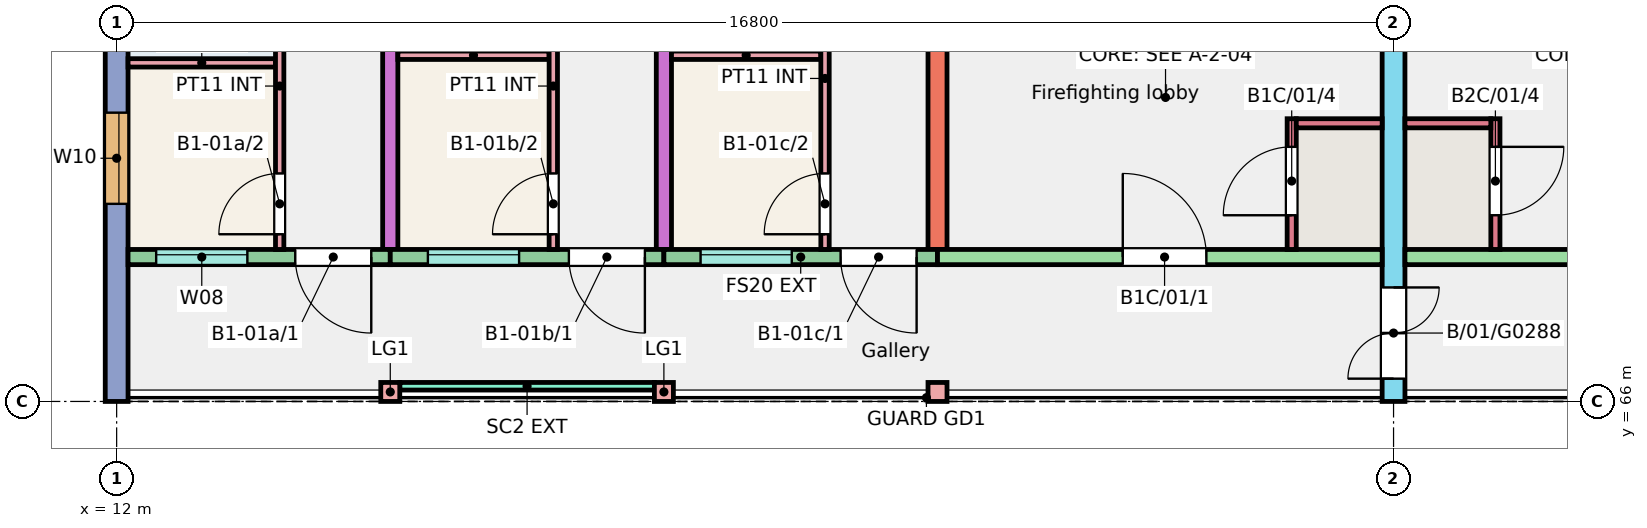
"""IFC4 building model, lengths in metres.
Left out: names, types, materials, properties, quantities, classifications, styles, units other than length and angle.
Written with IfcOpenShell. Run it as: python <this file> out.ifc"""

import sys

from ifc_helpers import new_model, si_unit, direction, frame, frame_2d, origin, origin_2d, place, context, subcontext, project, spatial, rectangle, extrude, element, fill, save


model = new_model("IFC4")
c1 = context("Model", 3, precision=1e-05, world=origin(), true_north=direction((0.0, 1.0)))
c2 = subcontext(c1, "Body", "Model", "MODEL_VIEW")
j1 = project(units=[si_unit("LENGTHUNIT", "METRE"), si_unit("PLANEANGLEUNIT", "RADIAN")], contexts=[c1])
p1 = place(None, origin())
s1 = spatial("IfcSite", under=j1, at=p1, CompositionType="ELEMENT")
p2 = place(p1, origin())
s2 = spatial("IfcBuilding", under=s1, at=p2, CompositionType="ELEMENT")
p3 = place(p2, frame((0.0, 0.0, 3.0)))
s3 = spatial("IfcBuildingStorey", under=s2, at=p3, CompositionType="ELEMENT", Elevation=3.0)
p4 = place(p3, frame((12.0, 66.0, 0.0), z_axis=(0.0, 0.0, 1.0), x_axis=(0.0, 1.0, 0.0)))
e1 = element("IfcWall", 1, at=p4, inside=s3, PredefinedType="SHEAR", context=c2, shape_type="SweptSolid", body=[
    extrude(rectangle(XDim=11.0, YDim=0.3, at=frame_2d((5.5, 0.0))), origin(), (0.0, 0.0, 1.0), 3.0),
])
p5 = place(p4, frame((2.6, 0.0, 0.9)))
e2 = element("IfcOpeningElement", 2, at=p5, cuts=e1, PredefinedType="OPENING", context=c2, shape_type="SweptSolid", body=[
    extrude(rectangle(XDim=1.2, YDim=1.5, at=frame_2d((0.6, 0.75))), frame((0.0, 0.16, 0.0), z_axis=(0.0, -1.0, 0.0), x_axis=(1.0, 0.0, 0.0)), (0.0, 0.0, 1.0), 0.32),
])
p6 = place(p4, frame((7.805, 0.0, 0.9)))
e3 = element("IfcOpeningElement", 3, at=p6, cuts=e1, PredefinedType="OPENING", context=c2, shape_type="SweptSolid", body=[
    extrude(rectangle(XDim=1.8, YDim=1.5, at=frame_2d((0.9, 0.75))), frame((0.0, 0.16, 0.0), z_axis=(0.0, -1.0, 0.0), x_axis=(1.0, 0.0, 0.0)), (0.0, 0.0, 1.0), 0.32),
])
for number, where, z_axis, x_axis in (
    (4, (15.6, 68.0, 0.0), (0.0, 0.0, 1.0), (0.0, 1.0, 0.0)),
    (5, (19.2, 68.0, 0.0), (0.0, 0.0, 1.0), (0.0, 1.0, 0.0)),
):
    element("IfcWall", number, at=place(p3, frame(where, z_axis=z_axis, x_axis=x_axis)), inside=s3, PredefinedType="SHEAR", context=c2, shape_type="SweptSolid", body=[
        extrude(rectangle(XDim=9.0, YDim=0.2, at=frame_2d((4.5, 0.0))), origin(), (0.0, 0.0, 1.0), 3.0),
    ])
p7 = place(p3, frame((22.8, 68.0, 0.0), z_axis=(0.0, 0.0, 1.0), x_axis=(0.0, 1.0, 0.0)))
e6 = element("IfcWall", 6, at=p7, inside=s3, PredefinedType="SHEAR", context=c2, shape_type="SweptSolid", body=[
    extrude(rectangle(XDim=9.0, YDim=0.25, at=frame_2d((4.5, 0.0))), origin(), (0.0, 0.0, 1.0), 3.0),
])
p8 = place(p3, frame((28.8, 66.0, 0.0), z_axis=(0.0, 0.0, 1.0), x_axis=(0.0, 1.0, 0.0)))
e7 = element("IfcWall", 7, at=p8, inside=s3, PredefinedType="SHEAR", context=c2, shape_type="SweptSolid", body=[
    extrude(rectangle(XDim=11.0, YDim=0.3, at=frame_2d((5.5, 0.0))), origin(), (0.0, 0.0, 1.0), 3.0),
])
p9 = place(p8, frame((0.3, 0.0, 0.0)))
e8 = element("IfcOpeningElement", 8, at=p9, cuts=e7, PredefinedType="OPENING", context=c2, shape_type="SweptSolid", body=[
    extrude(rectangle(XDim=1.2, YDim=2.1, at=frame_2d((0.6, 1.05))), frame((0.0, 0.16, 0.0), z_axis=(0.0, -1.0, 0.0), x_axis=(1.0, 0.0, 0.0)), (0.0, 0.0, 1.0), 0.32),
])
p10 = place(p3, frame((12.15, 67.9, 0.0), z_axis=(0.0, 0.0, 1.0), x_axis=(1.0, 0.0, 0.0)))
e9 = element("IfcWall", 9, at=p10, inside=s3, PredefinedType="SOLIDWALL", context=c2, shape_type="SweptSolid", body=[
    extrude(rectangle(XDim=3.45, YDim=0.2, at=frame_2d((1.725, 0.0))), origin(), (0.0, 0.0, 1.0), 3.0),
])
p11 = place(p10, frame((0.37, 0.0, 1.1)))
e10 = element("IfcOpeningElement", 10, at=p11, cuts=e9, PredefinedType="OPENING", context=c2, shape_type="SweptSolid", body=[
    extrude(rectangle(XDim=1.2, YDim=1.3, at=frame_2d((0.6, 0.65))), frame((0.0, 0.11, 0.0), z_axis=(0.0, -1.0, 0.0), x_axis=(1.0, 0.0, 0.0)), (0.0, 0.0, 1.0), 0.22),
])
p12 = place(p10, frame((2.2, 0.0, 0.0)))
e11 = element("IfcOpeningElement", 11, at=p12, cuts=e9, PredefinedType="OPENING", context=c2, shape_type="SweptSolid", body=[
    extrude(rectangle(XDim=1.0, YDim=2.1, at=frame_2d((0.5, 1.05))), frame((0.0, 0.11, 0.0), z_axis=(0.0, -1.0, 0.0), x_axis=(1.0, 0.0, 0.0)), (0.0, 0.0, 1.0), 0.22),
])
p13 = place(p3, frame((15.6, 67.9, 0.0), z_axis=(0.0, 0.0, 1.0), x_axis=(1.0, 0.0, 0.0)))
e12 = element("IfcWall", 12, at=p13, inside=s3, PredefinedType="SOLIDWALL", context=c2, shape_type="SweptSolid", body=[
    extrude(rectangle(XDim=3.6, YDim=0.2, at=frame_2d((1.8, 0.0))), origin(), (0.0, 0.0, 1.0), 3.0),
])
p14 = place(p13, frame((0.495, 0.0, 1.1)))
e13 = element("IfcOpeningElement", 13, at=p14, cuts=e12, PredefinedType="OPENING", context=c2, shape_type="SweptSolid", body=[
    extrude(rectangle(XDim=1.2, YDim=1.3, at=frame_2d((0.6, 0.65))), frame((0.0, 0.11, 0.0), z_axis=(0.0, -1.0, 0.0), x_axis=(1.0, 0.0, 0.0)), (0.0, 0.0, 1.0), 0.22),
])
p15 = place(p13, frame((2.35, 0.0, 0.0)))
e14 = element("IfcOpeningElement", 14, at=p15, cuts=e12, PredefinedType="OPENING", context=c2, shape_type="SweptSolid", body=[
    extrude(rectangle(XDim=1.0, YDim=2.1, at=frame_2d((0.5, 1.05))), frame((0.0, 0.11, 0.0), z_axis=(0.0, -1.0, 0.0), x_axis=(1.0, 0.0, 0.0)), (0.0, 0.0, 1.0), 0.22),
])
p16 = place(p3, frame((19.2, 67.9, 0.0), z_axis=(0.0, 0.0, 1.0), x_axis=(1.0, 0.0, 0.0)))
e15 = element("IfcWall", 15, at=p16, inside=s3, PredefinedType="SOLIDWALL", context=c2, shape_type="SweptSolid", body=[
    extrude(rectangle(XDim=3.6, YDim=0.2, at=frame_2d((1.8, 0.0))), origin(), (0.0, 0.0, 1.0), 3.0),
])
p17 = place(p16, frame((0.482, 0.0, 1.1)))
e16 = element("IfcOpeningElement", 16, at=p17, cuts=e15, PredefinedType="OPENING", context=c2, shape_type="SweptSolid", body=[
    extrude(rectangle(XDim=1.2, YDim=1.3, at=frame_2d((0.6, 0.65))), frame((0.0, 0.11, 0.0), z_axis=(0.0, -1.0, 0.0), x_axis=(1.0, 0.0, 0.0)), (0.0, 0.0, 1.0), 0.22),
])
p18 = place(p16, frame((2.325, 0.0, 0.0)))
e17 = element("IfcOpeningElement", 17, at=p18, cuts=e15, PredefinedType="OPENING", context=c2, shape_type="SweptSolid", body=[
    extrude(rectangle(XDim=1.0, YDim=2.1, at=frame_2d((0.5, 1.05))), frame((0.0, 0.11, 0.0), z_axis=(0.0, -1.0, 0.0), x_axis=(1.0, 0.0, 0.0)), (0.0, 0.0, 1.0), 0.22),
])
p19 = place(p3, frame((22.8, 67.9, 0.0), z_axis=(0.0, 0.0, 1.0), x_axis=(1.0, 0.0, 0.0)))
e18 = element("IfcWall", 18, at=p19, inside=s3, PredefinedType="SHEAR", context=c2, shape_type="SweptSolid", body=[
    extrude(rectangle(XDim=5.85, YDim=0.2, at=frame_2d((2.925, 0.0))), origin(), (0.0, 0.0, 1.0), 3.0),
])
p20 = place(p19, frame((2.438, 0.0, 0.0)))
e19 = element("IfcOpeningElement", 19, at=p20, cuts=e18, PredefinedType="OPENING", context=c2, shape_type="SweptSolid", body=[
    extrude(rectangle(XDim=1.1, YDim=2.1, at=frame_2d((0.55, 1.05))), frame((0.0, 0.11, 0.0), z_axis=(0.0, -1.0, 0.0), x_axis=(1.0, 0.0, 0.0)), (0.0, 0.0, 1.0), 0.22),
])
p21 = place(p3, frame((27.46, 68.0, 0.0), z_axis=(0.0, 0.0, 1.0), x_axis=(0.0, 1.0, 0.0)))
e20 = element("IfcWall", 20, at=p21, inside=s3, PredefinedType="SHEAR", context=c2, shape_type="SweptSolid", body=[
    extrude(rectangle(XDim=1.72, YDim=0.12, at=frame_2d((0.86, 0.0))), origin(), (0.0, 0.0, 1.0), 3.0),
])
p22 = place(p21, frame((0.45, 0.0, 0.0)))
e21 = element("IfcOpeningElement", 21, at=p22, cuts=e20, PredefinedType="OPENING", context=c2, shape_type="SweptSolid", body=[
    extrude(rectangle(XDim=0.9, YDim=2.1, at=frame_2d((0.45, 1.05))), frame((0.0, 0.07, 0.0), z_axis=(0.0, -1.0, 0.0), x_axis=(1.0, 0.0, 0.0)), (0.0, 0.0, 1.0), 0.14),
])
p23 = place(p3, frame((27.52, 69.66, 0.0), z_axis=(0.0, 0.0, 1.0), x_axis=(1.0, 0.0, 0.0)))
e22 = element("IfcWall", 22, at=p23, inside=s3, PredefinedType="SHEAR", context=c2, shape_type="SweptSolid", body=[
    extrude(rectangle(XDim=1.13, YDim=0.12, at=frame_2d((0.565, 0.0))), origin(), (0.0, 0.0, 1.0), 3.0),
])
p24 = place(p3, frame((28.95, 67.9, 0.0), z_axis=(0.0, 0.0, 1.0), x_axis=(1.0, 0.0, 0.0)))
e23 = element("IfcWall", 23, at=p24, inside=s3, PredefinedType="SHEAR", context=c2, shape_type="SweptSolid", body=[
    extrude(rectangle(XDim=5.85, YDim=0.2, at=frame_2d((2.925, 0.0))), origin(), (0.0, 0.0, 1.0), 3.0),
])
p25 = place(p24, frame((2.312, 0.0, 0.0)))
e24 = element("IfcOpeningElement", 24, at=p25, cuts=e23, PredefinedType="OPENING", context=c2, shape_type="SweptSolid", body=[
    extrude(rectangle(XDim=1.1, YDim=2.1, at=frame_2d((0.55, 1.05))), frame((0.0, 0.11, 0.0), z_axis=(0.0, -1.0, 0.0), x_axis=(1.0, 0.0, 0.0)), (0.0, 0.0, 1.0), 0.22),
])
p26 = place(p3, frame((30.14, 68.0, 0.0), z_axis=(0.0, 0.0, 1.0), x_axis=(0.0, 1.0, 0.0)))
e25 = element("IfcWall", 25, at=p26, inside=s3, PredefinedType="SHEAR", context=c2, shape_type="SweptSolid", body=[
    extrude(rectangle(XDim=1.72, YDim=0.12, at=frame_2d((0.86, 0.0))), origin(), (0.0, 0.0, 1.0), 3.0),
])
p27 = place(p26, frame((0.45, 0.0, 0.0)))
e26 = element("IfcOpeningElement", 26, at=p27, cuts=e25, PredefinedType="OPENING", context=c2, shape_type="SweptSolid", body=[
    extrude(rectangle(XDim=0.9, YDim=2.1, at=frame_2d((0.45, 1.05))), frame((0.0, 0.07, 0.0), z_axis=(0.0, -1.0, 0.0), x_axis=(1.0, 0.0, 0.0)), (0.0, 0.0, 1.0), 0.14),
])
p28 = place(p3, frame((28.95, 69.66, 0.0), z_axis=(0.0, 0.0, 1.0), x_axis=(1.0, 0.0, 0.0)))
e27 = element("IfcWall", 27, at=p28, inside=s3, PredefinedType="SHEAR", context=c2, shape_type="SweptSolid", body=[
    extrude(rectangle(XDim=1.13, YDim=0.12, at=frame_2d((0.565, 0.0))), origin(), (0.0, 0.0, 1.0), 3.0),
])
for number, where, z_axis, x_axis in (
    (28, (15.6, 66.125, 0.0), (0.0, 0.0, 1.0), (1.0, 0.0, 0.0)),
    (29, (19.2, 66.125, 0.0), (0.0, 0.0, 1.0), (1.0, 0.0, 0.0)),
    (30, (22.8, 66.125, 0.0), (0.0, 0.0, 1.0), (1.0, 0.0, 0.0)),
):
    element("IfcColumn", number, at=place(p3, frame(where, z_axis=z_axis, x_axis=x_axis)), inside=s3, PredefinedType="COLUMN", context=c2, shape_type="SweptSolid", body=[
        extrude(rectangle(XDim=0.25, YDim=0.25, at=origin_2d()), origin(), (0.0, 0.0, 1.0), 3.0),
    ])
p29 = place(p3, frame((15.725, 66.2, 0.0), z_axis=(0.0, 0.0, 1.0), x_axis=(1.0, 0.0, 0.0)))
e31 = element("IfcWall", 31, at=p29, inside=s3, PredefinedType="SOLIDWALL", context=c2, shape_type="SweptSolid", body=[
    extrude(rectangle(XDim=3.35, YDim=0.1, at=frame_2d((1.675, 0.0))), origin(), (0.0, 0.0, 1.0), 2.45),
])
p30 = place(p3, frame((12.15, 70.455, 0.0), z_axis=(0.0, 0.0, 1.0), x_axis=(1.0, 0.0, 0.0)))
e32 = element("IfcWall", 32, at=p30, inside=s3, PredefinedType="PARTITIONING", context=c2, shape_type="SweptSolid", body=[
    extrude(rectangle(XDim=1.94, YDim=0.11, at=frame_2d((0.97, 0.0))), origin(), (0.0, 0.0, 1.0), 2.8),
])
p31 = place(p3, frame((14.145, 68.0, 0.0), z_axis=(0.0, 0.0, 1.0), x_axis=(0.0, 1.0, 0.0)))
e33 = element("IfcWall", 33, at=p31, inside=s3, PredefinedType="PARTITIONING", context=c2, shape_type="SweptSolid", body=[
    extrude(rectangle(XDim=4.3, YDim=0.11, at=frame_2d((2.15, 0.0))), origin(), (0.0, 0.0, 1.0), 2.8),
])
p32 = place(p31, frame((0.2, 0.0, 0.0)))
e34 = element("IfcOpeningElement", 34, at=p32, cuts=e33, PredefinedType="OPENING", context=c2, shape_type="SweptSolid", body=[
    extrude(rectangle(XDim=0.8, YDim=2.1, at=frame_2d((0.4, 1.05))), frame((0.0, 0.065, 0.0), z_axis=(0.0, -1.0, 0.0), x_axis=(1.0, 0.0, 0.0)), (0.0, 0.0, 1.0), 0.13),
])
p33 = place(p31, frame((3.35, 0.0, 0.0)))
e35 = element("IfcOpeningElement", 35, at=p33, cuts=e33, PredefinedType="OPENING", context=c2, shape_type="SweptSolid", body=[
    extrude(rectangle(XDim=0.8, YDim=2.1, at=frame_2d((0.4, 1.05))), frame((0.0, 0.065, 0.0), z_axis=(0.0, -1.0, 0.0), x_axis=(1.0, 0.0, 0.0)), (0.0, 0.0, 1.0), 0.13),
])
p34 = place(p3, frame((15.7, 70.555, 0.0), z_axis=(0.0, 0.0, 1.0), x_axis=(1.0, 0.0, 0.0)))
e36 = element("IfcWall", 36, at=p34, inside=s3, PredefinedType="PARTITIONING", context=c2, shape_type="SweptSolid", body=[
    extrude(rectangle(XDim=1.99, YDim=0.11, at=frame_2d((0.995, 0.0))), origin(), (0.0, 0.0, 1.0), 2.8),
])
p35 = place(p3, frame((17.745, 68.0, 0.0), z_axis=(0.0, 0.0, 1.0), x_axis=(0.0, 1.0, 0.0)))
e37 = element("IfcWall", 37, at=p35, inside=s3, PredefinedType="PARTITIONING", context=c2, shape_type="SweptSolid", body=[
    extrude(rectangle(XDim=4.3, YDim=0.11, at=frame_2d((2.15, 0.0))), origin(), (0.0, 0.0, 1.0), 2.8),
])
p36 = place(p35, frame((0.2, 0.0, 0.0)))
e38 = element("IfcOpeningElement", 38, at=p36, cuts=e37, PredefinedType="OPENING", context=c2, shape_type="SweptSolid", body=[
    extrude(rectangle(XDim=0.8, YDim=2.1, at=frame_2d((0.4, 1.05))), frame((0.0, 0.065, 0.0), z_axis=(0.0, -1.0, 0.0), x_axis=(1.0, 0.0, 0.0)), (0.0, 0.0, 1.0), 0.13),
])
p37 = place(p35, frame((3.35, 0.0, 0.0)))
e39 = element("IfcOpeningElement", 39, at=p37, cuts=e37, PredefinedType="OPENING", context=c2, shape_type="SweptSolid", body=[
    extrude(rectangle(XDim=0.8, YDim=2.1, at=frame_2d((0.4, 1.05))), frame((0.0, 0.065, 0.0), z_axis=(0.0, -1.0, 0.0), x_axis=(1.0, 0.0, 0.0)), (0.0, 0.0, 1.0), 0.13),
])
p38 = place(p3, frame((19.3, 70.555, 0.0), z_axis=(0.0, 0.0, 1.0), x_axis=(1.0, 0.0, 0.0)))
e40 = element("IfcWall", 40, at=p38, inside=s3, PredefinedType="PARTITIONING", context=c2, shape_type="SweptSolid", body=[
    extrude(rectangle(XDim=1.965, YDim=0.11, at=frame_2d((0.982, 0.0))), origin(), (0.0, 0.0, 1.0), 2.8),
])
p39 = place(p3, frame((21.32, 68.0, 0.0), z_axis=(0.0, 0.0, 1.0), x_axis=(0.0, 1.0, 0.0)))
e41 = element("IfcWall", 41, at=p39, inside=s3, PredefinedType="PARTITIONING", context=c2, shape_type="SweptSolid", body=[
    extrude(rectangle(XDim=4.5, YDim=0.11, at=frame_2d((2.25, 0.0))), origin(), (0.0, 0.0, 1.0), 2.8),
])
p40 = place(p39, frame((0.2, 0.0, 0.0)))
e42 = element("IfcOpeningElement", 42, at=p40, cuts=e41, PredefinedType="OPENING", context=c2, shape_type="SweptSolid", body=[
    extrude(rectangle(XDim=0.8, YDim=2.1, at=frame_2d((0.4, 1.05))), frame((0.0, 0.065, 0.0), z_axis=(0.0, -1.0, 0.0), x_axis=(1.0, 0.0, 0.0)), (0.0, 0.0, 1.0), 0.13),
])
p41 = place(p39, frame((3.55, 0.0, 0.0)))
e43 = element("IfcOpeningElement", 43, at=p41, cuts=e41, PredefinedType="OPENING", context=c2, shape_type="SweptSolid", body=[
    extrude(rectangle(XDim=0.8, YDim=2.1, at=frame_2d((0.4, 1.05))), frame((0.0, 0.065, 0.0), z_axis=(0.0, -1.0, 0.0), x_axis=(1.0, 0.0, 0.0)), (0.0, 0.0, 1.0), 0.13),
])
p42 = place(p11, origin())
e44 = element("IfcWindow", 44, at=p42, inside=s3, PartitioningType="SINGLE_PANEL", PredefinedType="WINDOW", context=c2, shape_type="SweptSolid", body=[
    extrude(rectangle(XDim=1.2, YDim=1.3, at=frame_2d((0.6, 0.65))), frame((0.0, 0.06, 0.0), z_axis=(0.0, -1.0, 0.0), x_axis=(1.0, 0.0, 0.0)), (0.0, 0.0, 1.0), 0.06),
])
fill(e10, e44)
p43 = place(p5, origin())
e45 = element("IfcWindow", 45, at=p43, inside=s3, PartitioningType="SINGLE_PANEL", PredefinedType="WINDOW", context=c2, shape_type="SweptSolid", body=[
    extrude(rectangle(XDim=1.2, YDim=1.5, at=frame_2d((0.6, 0.75))), frame((0.0, 0.0, 0.0), z_axis=(0.0, -1.0, 0.0), x_axis=(1.0, 0.0, 0.0)), (0.0, 0.0, 1.0), 0.06),
])
fill(e2, e45)
p44 = place(p14, origin())
e46 = element("IfcWindow", 46, at=p44, inside=s3, PartitioningType="SINGLE_PANEL", PredefinedType="WINDOW", context=c2, shape_type="SweptSolid", body=[
    extrude(rectangle(XDim=1.2, YDim=1.3, at=frame_2d((0.6, 0.65))), frame((0.0, 0.06, 0.0), z_axis=(0.0, -1.0, 0.0), x_axis=(1.0, 0.0, 0.0)), (0.0, 0.0, 1.0), 0.06),
])
fill(e13, e46)
p45 = place(p17, origin())
e47 = element("IfcWindow", 47, at=p45, inside=s3, PartitioningType="SINGLE_PANEL", PredefinedType="WINDOW", context=c2, shape_type="SweptSolid", body=[
    extrude(rectangle(XDim=1.2, YDim=1.3, at=frame_2d((0.6, 0.65))), frame((0.0, 0.06, 0.0), z_axis=(0.0, -1.0, 0.0), x_axis=(1.0, 0.0, 0.0)), (0.0, 0.0, 1.0), 0.06),
])
fill(e16, e47)
p46 = place(p12, origin())
e48 = element("IfcDoor", 48, at=p46, inside=s3, OperationType="SINGLE_SWING_RIGHT", PredefinedType="DOOR", context=c2, shape_type="SweptSolid", body=[
    extrude(rectangle(XDim=1.0, YDim=2.1, at=frame_2d((0.5, 1.05))), frame((0.0, 0.025, 0.0), z_axis=(0.0, -1.0, 0.0), x_axis=(1.0, 0.0, 0.0)), (0.0, 0.0, 1.0), 0.05),
])
fill(e11, e48)
p47 = place(p32, origin())
e49 = element("IfcDoor", 49, at=p47, inside=s3, OperationType="SINGLE_SWING_LEFT", PredefinedType="DOOR", context=c2, shape_type="SweptSolid", body=[
    extrude(rectangle(XDim=0.8, YDim=2.1, at=frame_2d((0.4, 1.05))), frame((0.0, 0.025, 0.0), z_axis=(0.0, -1.0, 0.0), x_axis=(1.0, 0.0, 0.0)), (0.0, 0.0, 1.0), 0.05),
])
fill(e34, e49)
p48 = place(p15, origin())
e50 = element("IfcDoor", 50, at=p48, inside=s3, OperationType="SINGLE_SWING_RIGHT", PredefinedType="DOOR", context=c2, shape_type="SweptSolid", body=[
    extrude(rectangle(XDim=1.0, YDim=2.1, at=frame_2d((0.5, 1.05))), frame((0.0, 0.025, 0.0), z_axis=(0.0, -1.0, 0.0), x_axis=(1.0, 0.0, 0.0)), (0.0, 0.0, 1.0), 0.05),
])
fill(e14, e50)
p49 = place(p36, origin())
e51 = element("IfcDoor", 51, at=p49, inside=s3, OperationType="SINGLE_SWING_LEFT", PredefinedType="DOOR", context=c2, shape_type="SweptSolid", body=[
    extrude(rectangle(XDim=0.8, YDim=2.1, at=frame_2d((0.4, 1.05))), frame((0.0, 0.025, 0.0), z_axis=(0.0, -1.0, 0.0), x_axis=(1.0, 0.0, 0.0)), (0.0, 0.0, 1.0), 0.05),
])
fill(e38, e51)
p50 = place(p18, origin())
e52 = element("IfcDoor", 52, at=p50, inside=s3, OperationType="SINGLE_SWING_RIGHT", PredefinedType="DOOR", context=c2, shape_type="SweptSolid", body=[
    extrude(rectangle(XDim=1.0, YDim=2.1, at=frame_2d((0.5, 1.05))), frame((0.0, 0.025, 0.0), z_axis=(0.0, -1.0, 0.0), x_axis=(1.0, 0.0, 0.0)), (0.0, 0.0, 1.0), 0.05),
])
fill(e17, e52)
p51 = place(p40, origin())
e53 = element("IfcDoor", 53, at=p51, inside=s3, OperationType="SINGLE_SWING_LEFT", PredefinedType="DOOR", context=c2, shape_type="SweptSolid", body=[
    extrude(rectangle(XDim=0.8, YDim=2.1, at=frame_2d((0.4, 1.05))), frame((0.0, 0.025, 0.0), z_axis=(0.0, -1.0, 0.0), x_axis=(1.0, 0.0, 0.0)), (0.0, 0.0, 1.0), 0.05),
])
fill(e42, e53)
p52 = place(p20, origin())
e54 = element("IfcDoor", 54, at=p52, inside=s3, OperationType="SINGLE_SWING_LEFT", PredefinedType="DOOR", context=c2, shape_type="SweptSolid", body=[
    extrude(rectangle(XDim=1.1, YDim=2.1, at=frame_2d((0.55, 1.05))), frame((0.0, 0.025, 0.0), z_axis=(0.0, -1.0, 0.0), x_axis=(1.0, 0.0, 0.0)), (0.0, 0.0, 1.0), 0.05),
])
fill(e19, e54)
p53 = place(p22, origin())
e55 = element("IfcDoor", 55, at=p53, inside=s3, OperationType="SINGLE_SWING_LEFT", PredefinedType="DOOR", context=c2, shape_type="SweptSolid", body=[
    extrude(rectangle(XDim=0.9, YDim=2.1, at=frame_2d((0.45, 1.05))), frame((0.0, 0.025, 0.0), z_axis=(0.0, -1.0, 0.0), x_axis=(1.0, 0.0, 0.0)), (0.0, 0.0, 1.0), 0.05),
])
fill(e21, e55)
p54 = place(p27, origin())
e56 = element("IfcDoor", 56, at=p54, inside=s3, OperationType="SINGLE_SWING_RIGHT", PredefinedType="DOOR", context=c2, shape_type="SweptSolid", body=[
    extrude(rectangle(XDim=0.9, YDim=2.1, at=frame_2d((0.45, 1.05))), frame((0.0, 0.025, 0.0), z_axis=(0.0, -1.0, 0.0), x_axis=(1.0, 0.0, 0.0)), (0.0, 0.0, 1.0), 0.05),
])
fill(e26, e56)
p55 = place(p9, origin())
e57 = element("IfcDoor", 57, at=p55, inside=s3, OperationType="DOUBLE_DOOR_SINGLE_SWING", PredefinedType="DOOR", context=c2, shape_type="SweptSolid", body=[
    extrude(rectangle(XDim=1.2, YDim=2.1, at=frame_2d((0.6, 1.05))), frame((0.0, 0.025, 0.0), z_axis=(0.0, -1.0, 0.0), x_axis=(1.0, 0.0, 0.0)), (0.0, 0.0, 1.0), 0.05),
])
fill(e8, e57)
save(model, sys.argv[1])
